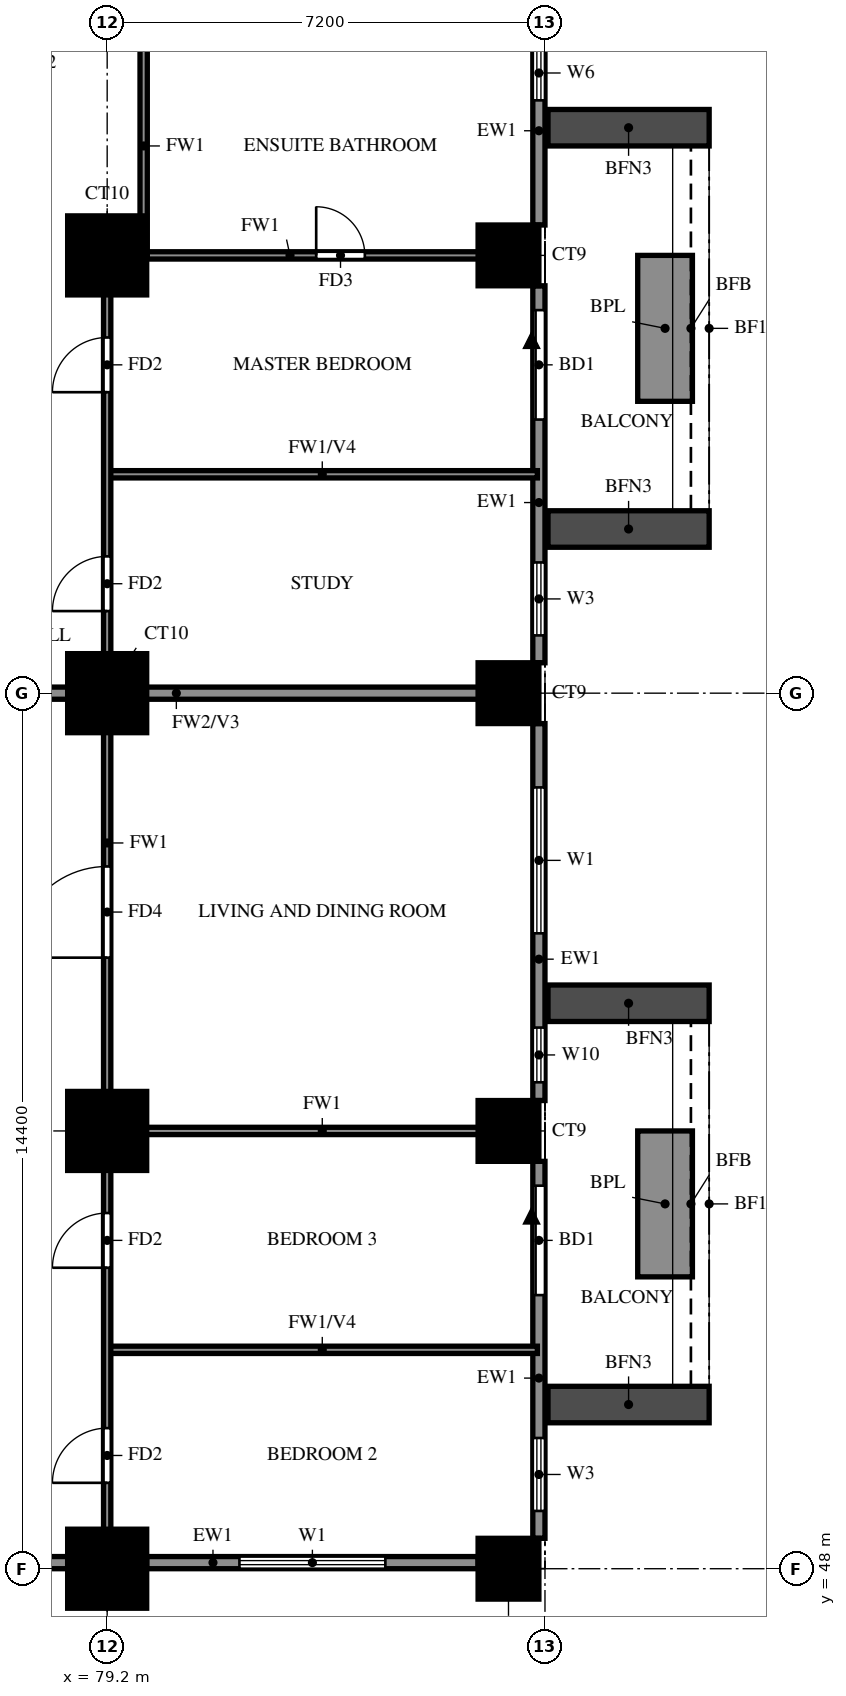
"""IFC4 building model, lengths in metres.
Left out: names, types, materials, properties, quantities, classifications, styles, units other than length and angle.
Written with IfcOpenShell. Run it as: python <this file> out.ifc"""

import sys

from ifc_helpers import new_model, si_unit, direction, frame, frame_2d, origin, origin_2d, place, context, subcontext, project, spatial, rectangle, extrude, source, transform, mapped, element, fill, save


model = new_model("IFC4")
c1 = context("Model", 3, precision=1e-05, world=origin(), true_north=direction((0.0, 1.0)))
c2 = subcontext(c1, "Body", "Model", "MODEL_VIEW")
j1 = project(units=[si_unit("LENGTHUNIT", "METRE"), si_unit("PLANEANGLEUNIT", "RADIAN")], contexts=[c1])
p1 = place(None, origin())
s1 = spatial("IfcSite", under=j1, at=p1, CompositionType="ELEMENT")
p2 = place(p1, origin())
s2 = spatial("IfcBuilding", under=s1, at=p2, CompositionType="ELEMENT")
p3 = place(p2, frame((0.0, 0.0, 65.5)))
s3 = spatial("IfcBuildingStorey", under=s2, at=p3, CompositionType="ELEMENT", Elevation=65.5)
m1 = source(origin(), c2, "Body", "SweptSolid", [
    extrude(rectangle(XDim=1.3, YDim=1.3, at=origin_2d()), origin(), (0.0, 0.0, 1.0), 3.18),
])
p4 = place(p3, frame((79.2, 48.0, 0.0), z_axis=(0.0, 0.0, 1.0), x_axis=(1.0, 0.0, 0.0)))
e1 = element("IfcColumn", 1, at=p4, inside=s3, PredefinedType="COLUMN", context=c2, shape_type="MappedRepresentation", body=[
    mapped(m1, transform((0.0, 0.0, 0.0))),
])
m2 = source(origin(), c2, "Body", "SweptSolid", [
    extrude(rectangle(XDim=1.0, YDim=1.0, at=origin_2d()), origin(), (0.0, 0.0, 1.0), 3.18),
])
p5 = place(p3, frame((85.8, 48.0, 0.0), z_axis=(0.0, 0.0, 1.0), x_axis=(1.0, 0.0, 0.0)))
e2 = element("IfcColumn", 2, at=p5, inside=s3, PredefinedType="COLUMN", context=c2, shape_type="MappedRepresentation", body=[
    mapped(m2, transform((0.0, 0.0, 0.0))),
])
p6 = place(p3, frame((79.2, 55.2, 0.0), z_axis=(0.0, 0.0, 1.0), x_axis=(1.0, 0.0, 0.0)))
e3 = element("IfcColumn", 3, at=p6, inside=s3, PredefinedType="COLUMN", context=c2, shape_type="MappedRepresentation", body=[
    mapped(m1, transform((0.0, 0.0, 0.0))),
])
p7 = place(p3, frame((85.8, 55.2, 0.0), z_axis=(0.0, 0.0, 1.0), x_axis=(1.0, 0.0, 0.0)))
e4 = element("IfcColumn", 4, at=p7, inside=s3, PredefinedType="COLUMN", context=c2, shape_type="MappedRepresentation", body=[
    mapped(m2, transform((0.0, 0.0, 0.0))),
])
p8 = place(p3, frame((79.2, 62.4, 0.0), z_axis=(0.0, 0.0, 1.0), x_axis=(1.0, 0.0, 0.0)))
e5 = element("IfcColumn", 5, at=p8, inside=s3, PredefinedType="COLUMN", context=c2, shape_type="MappedRepresentation", body=[
    mapped(m1, transform((0.0, 0.0, 0.0))),
])
p9 = place(p3, frame((85.8, 62.4, 0.0), z_axis=(0.0, 0.0, 1.0), x_axis=(1.0, 0.0, 0.0)))
e6 = element("IfcColumn", 6, at=p9, inside=s3, PredefinedType="COLUMN", context=c2, shape_type="MappedRepresentation", body=[
    mapped(m2, transform((0.0, 0.0, 0.0))),
])
p10 = place(p3, frame((79.2, 69.6, 0.0), z_axis=(0.0, 0.0, 1.0), x_axis=(1.0, 0.0, 0.0)))
e7 = element("IfcColumn", 7, at=p10, inside=s3, PredefinedType="COLUMN", context=c2, shape_type="MappedRepresentation", body=[
    mapped(m1, transform((0.0, 0.0, 0.0))),
])
p11 = place(p3, frame((85.8, 69.6, 0.0), z_axis=(0.0, 0.0, 1.0), x_axis=(1.0, 0.0, 0.0)))
e8 = element("IfcColumn", 8, at=p11, inside=s3, PredefinedType="COLUMN", context=c2, shape_type="MappedRepresentation", body=[
    mapped(m2, transform((0.0, 0.0, 0.0))),
])
p12 = place(p3, frame((85.996, 33.863, 0.0), z_axis=(0.0, 0.0, 1.0), x_axis=(-0.707100718496, 0.707112843825, 0.0)))
e9 = element("IfcWall", 9, at=p12, inside=s3, PredefinedType="SOLIDWALL", context=c2, shape_type="SweptSolid", body=[
    extrude(rectangle(XDim=20.135, YDim=0.2, at=frame_2d((10.067, 0.0))), origin(), (0.0, 0.0, 1.0), 3.18),
])
p13 = place(p3, frame((71.989, 48.1, 0.0), z_axis=(0.0, 0.0, 1.0), x_axis=(1.0, 0.0, 0.0)))
e10 = element("IfcWall", 10, at=p13, inside=s3, PredefinedType="SOLIDWALL", context=c2, shape_type="SweptSolid", body=[
    extrude(rectangle(XDim=6.562, YDim=0.2, at=frame_2d((3.281, 0.0))), origin(), (0.0, 0.0, 1.0), 3.18),
])
p14 = place(p3, frame((79.85, 48.1, 0.0), z_axis=(0.0, 0.0, 1.0), x_axis=(1.0, 0.0, 0.0)))
e11 = element("IfcWall", 11, at=p14, inside=s3, PredefinedType="SOLIDWALL", context=c2, shape_type="SweptSolid", body=[
    extrude(rectangle(XDim=5.45, YDim=0.2, at=frame_2d((2.725, 0.0))), origin(), (0.0, 0.0, 1.0), 3.18),
])
p15 = place(p14, frame((1.525, 0.0, 0.6)))
e12 = element("IfcOpeningElement", 12, at=p15, cuts=e11, PredefinedType="OPENING", context=c2, shape_type="SweptSolid", body=[
    extrude(rectangle(XDim=2.4, YDim=2.4, at=frame_2d((1.2, 1.2))), frame((0.0, 0.11, 0.0), z_axis=(0.0, -1.0, 0.0), x_axis=(1.0, 0.0, 0.0)), (0.0, 0.0, 1.0), 0.22),
])
p16 = place(p3, frame((86.3, 48.5, 0.0), z_axis=(0.0, 0.0, 1.0), x_axis=(0.0, 1.0, 0.0)))
e13 = element("IfcWall", 13, at=p16, inside=s3, PredefinedType="SOLIDWALL", context=c2, shape_type="SweptSolid", body=[
    extrude(rectangle(XDim=6.2, YDim=0.2, at=frame_2d((3.1, 0.0))), origin(), (0.0, 0.0, 1.0), 3.18),
])
p17 = place(p16, frame((4.0, 0.0, 0.0)))
e14 = element("IfcOpeningElement", 14, at=p17, cuts=e13, PredefinedType="OPENING", context=c2, shape_type="SweptSolid", body=[
    extrude(rectangle(XDim=1.8, YDim=2.4, at=frame_2d((0.9, 1.2))), frame((0.0, 0.11, 0.0), z_axis=(0.0, -1.0, 0.0), x_axis=(1.0, 0.0, 0.0)), (0.0, 0.0, 1.0), 0.22),
])
p18 = place(p16, frame((0.45, 0.0, 0.6)))
e15 = element("IfcOpeningElement", 15, at=p18, cuts=e13, PredefinedType="OPENING", context=c2, shape_type="SweptSolid", body=[
    extrude(rectangle(XDim=1.2, YDim=2.4, at=frame_2d((0.6, 1.2))), frame((0.0, 0.11, 0.0), z_axis=(0.0, -1.0, 0.0), x_axis=(1.0, 0.0, 0.0)), (0.0, 0.0, 1.0), 0.22),
])
p19 = place(p3, frame((86.3, 55.7, 0.0), z_axis=(0.0, 0.0, 1.0), x_axis=(0.0, 1.0, 0.0)))
e16 = element("IfcWall", 16, at=p19, inside=s3, PredefinedType="SOLIDWALL", context=c2, shape_type="SweptSolid", body=[
    extrude(rectangle(XDim=6.2, YDim=0.2, at=frame_2d((3.1, 0.0))), origin(), (0.0, 0.0, 1.0), 3.18),
])
p20 = place(p19, frame((0.3, 0.0, 0.6)))
e17 = element("IfcOpeningElement", 17, at=p20, cuts=e16, PredefinedType="OPENING", context=c2, shape_type="SweptSolid", body=[
    extrude(rectangle(XDim=0.9, YDim=2.4, at=frame_2d((0.45, 1.2))), frame((0.0, 0.11, 0.0), z_axis=(0.0, -1.0, 0.0), x_axis=(1.0, 0.0, 0.0)), (0.0, 0.0, 1.0), 0.22),
])
p21 = place(p19, frame((2.75, 0.0, 0.6)))
e18 = element("IfcOpeningElement", 18, at=p21, cuts=e16, PredefinedType="OPENING", context=c2, shape_type="SweptSolid", body=[
    extrude(rectangle(XDim=2.4, YDim=2.4, at=frame_2d((1.2, 1.2))), frame((0.0, 0.11, 0.0), z_axis=(0.0, -1.0, 0.0), x_axis=(1.0, 0.0, 0.0)), (0.0, 0.0, 1.0), 0.22),
])
p22 = place(p3, frame((86.3, 62.9, 0.0), z_axis=(0.0, 0.0, 1.0), x_axis=(0.0, 1.0, 0.0)))
e19 = element("IfcWall", 19, at=p22, inside=s3, PredefinedType="SOLIDWALL", context=c2, shape_type="SweptSolid", body=[
    extrude(rectangle(XDim=6.2, YDim=0.2, at=frame_2d((3.1, 0.0))), origin(), (0.0, 0.0, 1.0), 3.18),
])
p23 = place(p22, frame((4.0, 0.0, 0.0)))
e20 = element("IfcOpeningElement", 20, at=p23, cuts=e19, PredefinedType="OPENING", context=c2, shape_type="SweptSolid", body=[
    extrude(rectangle(XDim=1.8, YDim=2.4, at=frame_2d((0.9, 1.2))), frame((0.0, 0.11, 0.0), z_axis=(0.0, -1.0, 0.0), x_axis=(1.0, 0.0, 0.0)), (0.0, 0.0, 1.0), 0.22),
])
p24 = place(p22, frame((0.45, 0.0, 0.6)))
e21 = element("IfcOpeningElement", 21, at=p24, cuts=e19, PredefinedType="OPENING", context=c2, shape_type="SweptSolid", body=[
    extrude(rectangle(XDim=1.2, YDim=2.4, at=frame_2d((0.6, 1.2))), frame((0.0, 0.11, 0.0), z_axis=(0.0, -1.0, 0.0), x_axis=(1.0, 0.0, 0.0)), (0.0, 0.0, 1.0), 0.22),
])
p25 = place(p3, frame((86.3, 70.1, 0.0), z_axis=(0.0, 0.0, 1.0), x_axis=(0.0, 1.0, 0.0)))
e22 = element("IfcWall", 22, at=p25, inside=s3, PredefinedType="SOLIDWALL", context=c2, shape_type="SweptSolid", body=[
    extrude(rectangle(XDim=6.2, YDim=0.2, at=frame_2d((3.1, 0.0))), origin(), (0.0, 0.0, 1.0), 3.18),
])
p26 = place(p25, frame((2.05, 0.0, 1.5)))
e23 = element("IfcOpeningElement", 23, at=p26, cuts=e22, PredefinedType="OPENING", context=c2, shape_type="SweptSolid", body=[
    extrude(rectangle(XDim=0.9, YDim=0.9, at=frame_2d((0.45, 0.45))), frame((0.0, 0.11, 0.0), z_axis=(0.0, -1.0, 0.0), x_axis=(1.0, 0.0, 0.0)), (0.0, 0.0, 1.0), 0.22),
])
p27 = place(p25, frame((3.65, 0.0, 0.6)))
e24 = element("IfcOpeningElement", 24, at=p27, cuts=e22, PredefinedType="OPENING", context=c2, shape_type="SweptSolid", body=[
    extrude(rectangle(XDim=1.8, YDim=2.4, at=frame_2d((0.9, 1.2))), frame((0.0, 0.11, 0.0), z_axis=(0.0, -1.0, 0.0), x_axis=(1.0, 0.0, 0.0)), (0.0, 0.0, 1.0), 0.22),
])
for number, where, z_axis, x_axis in (
    (25, (86.45, 50.7, 0.0), (0.0, 0.0, 1.0), (1.0, 0.0, 0.0)),
    (26, (86.45, 57.3, 0.0), (0.0, 0.0, 1.0), (1.0, 0.0, 0.0)),
):
    element("IfcWall", number, at=place(p3, frame(where, z_axis=z_axis, x_axis=x_axis)), inside=s3, PredefinedType="SOLIDWALL", context=c2, shape_type="SweptSolid", body=[
        extrude(rectangle(XDim=2.65, YDim=0.6, at=frame_2d((1.325, 0.0))), origin(), (0.0, 0.0, 1.0), 2.85),
    ])
p28 = place(p3, frame((88.375, 52.8, 0.0), z_axis=(0.0, 0.0, 1.0), x_axis=(0.0, 1.0, 0.0)))
e27 = element("IfcWall", 27, at=p28, inside=s3, PredefinedType="SOLIDWALL", context=c2, shape_type="SweptSolid", body=[
    extrude(rectangle(XDim=2.4, YDim=0.9, at=frame_2d((1.2, 0.0))), origin(), (0.0, 0.0, 1.0), 0.9),
])
for number, where, z_axis, x_axis in (
    (28, (86.45, 65.1, 0.0), (0.0, 0.0, 1.0), (1.0, 0.0, 0.0)),
    (29, (86.45, 71.7, 0.0), (0.0, 0.0, 1.0), (1.0, 0.0, 0.0)),
):
    element("IfcWall", number, at=place(p3, frame(where, z_axis=z_axis, x_axis=x_axis)), inside=s3, PredefinedType="SOLIDWALL", context=c2, shape_type="SweptSolid", body=[
        extrude(rectangle(XDim=2.65, YDim=0.6, at=frame_2d((1.325, 0.0))), origin(), (0.0, 0.0, 1.0), 2.85),
    ])
p29 = place(p3, frame((88.375, 67.2, 0.0), z_axis=(0.0, 0.0, 1.0), x_axis=(0.0, 1.0, 0.0)))
e30 = element("IfcWall", 30, at=p29, inside=s3, PredefinedType="SOLIDWALL", context=c2, shape_type="SweptSolid", body=[
    extrude(rectangle(XDim=2.4, YDim=0.9, at=frame_2d((1.2, 0.0))), origin(), (0.0, 0.0, 1.0), 0.9),
])
p30 = place(p3, frame((74.4, 62.4, 0.0), z_axis=(0.0, 0.0, 1.0), x_axis=(1.0, 0.0, 0.0)))
e31 = element("IfcWall", 31, at=p30, inside=s3, PredefinedType="SOLIDWALL", context=c2, shape_type="SweptSolid", body=[
    extrude(rectangle(XDim=11.875, YDim=0.2, at=frame_2d((5.938, 0.0))), origin(), (0.0, 0.0, 1.0), 3.18),
])
p31 = place(p3, frame((79.2, 51.6, 0.0), z_axis=(0.0, 0.0, 1.0), x_axis=(1.0, 0.0, 0.0)))
e32 = element("IfcWall", 32, at=p31, inside=s3, PredefinedType="PARTITIONING", context=c2, shape_type="SweptSolid", body=[
    extrude(rectangle(XDim=7.075, YDim=0.12, at=frame_2d((3.538, 0.0))), origin(), (0.0, 0.0, 1.0), 2.28),
])
p32 = place(p3, frame((79.2, 55.2, 0.0), z_axis=(0.0, 0.0, 1.0), x_axis=(1.0, 0.0, 0.0)))
e33 = element("IfcWall", 33, at=p32, inside=s3, PredefinedType="PARTITIONING", context=c2, shape_type="SweptSolid", body=[
    extrude(rectangle(XDim=7.075, YDim=0.12, at=frame_2d((3.538, 0.0))), origin(), (0.0, 0.0, 1.0), 3.18),
])
p33 = place(p3, frame((79.2, 66.0, 0.0), z_axis=(0.0, 0.0, 1.0), x_axis=(1.0, 0.0, 0.0)))
e34 = element("IfcWall", 34, at=p33, inside=s3, PredefinedType="PARTITIONING", context=c2, shape_type="SweptSolid", body=[
    extrude(rectangle(XDim=7.075, YDim=0.12, at=frame_2d((3.538, 0.0))), origin(), (0.0, 0.0, 1.0), 2.28),
])
p34 = place(p3, frame((79.2, 69.6, 0.0), z_axis=(0.0, 0.0, 1.0), x_axis=(1.0, 0.0, 0.0)))
e35 = element("IfcWall", 35, at=p34, inside=s3, PredefinedType="PARTITIONING", context=c2, shape_type="SweptSolid", body=[
    extrude(rectangle(XDim=7.075, YDim=0.12, at=frame_2d((3.538, 0.0))), origin(), (0.0, 0.0, 1.0), 3.18),
])
p35 = place(p34, frame((3.438, 0.0, 0.0)))
e36 = element("IfcOpeningElement", 36, at=p35, cuts=e35, PredefinedType="OPENING", context=c2, shape_type="SweptSolid", body=[
    extrude(rectangle(XDim=0.8, YDim=2.1, at=frame_2d((0.4, 1.05))), frame((0.0, 0.07, 0.0), z_axis=(0.0, -1.0, 0.0), x_axis=(1.0, 0.0, 0.0)), (0.0, 0.0, 1.0), 0.14),
])
p36 = place(p3, frame((79.2, 48.125, 0.0), z_axis=(0.0, 0.0, 1.0), x_axis=(0.0, 1.0, 0.0)))
e37 = element("IfcWall", 37, at=p36, inside=s3, PredefinedType="PARTITIONING", context=c2, shape_type="SweptSolid", body=[
    extrude(rectangle(XDim=21.475, YDim=0.12, at=frame_2d((10.738, 0.0))), origin(), (0.0, 0.0, 1.0), 3.18),
])
p37 = place(p36, frame((1.288, 0.0, 0.0)))
e38 = element("IfcOpeningElement", 38, at=p37, cuts=e37, PredefinedType="OPENING", context=c2, shape_type="SweptSolid", body=[
    extrude(rectangle(XDim=0.9, YDim=2.1, at=frame_2d((0.45, 1.05))), frame((0.0, 0.07, 0.0), z_axis=(0.0, -1.0, 0.0), x_axis=(1.0, 0.0, 0.0)), (0.0, 0.0, 1.0), 0.14),
])
p38 = place(p36, frame((4.825, 0.0, 0.0)))
e39 = element("IfcOpeningElement", 39, at=p38, cuts=e37, PredefinedType="OPENING", context=c2, shape_type="SweptSolid", body=[
    extrude(rectangle(XDim=0.9, YDim=2.1, at=frame_2d((0.45, 1.05))), frame((0.0, 0.07, 0.0), z_axis=(0.0, -1.0, 0.0), x_axis=(1.0, 0.0, 0.0)), (0.0, 0.0, 1.0), 0.14),
])
p39 = place(p36, frame((9.925, 0.0, 0.0)))
e40 = element("IfcOpeningElement", 40, at=p39, cuts=e37, PredefinedType="OPENING", context=c2, shape_type="SweptSolid", body=[
    extrude(rectangle(XDim=1.5, YDim=2.1, at=frame_2d((0.75, 1.05))), frame((0.0, 0.07, 0.0), z_axis=(0.0, -1.0, 0.0), x_axis=(1.0, 0.0, 0.0)), (0.0, 0.0, 1.0), 0.14),
])
p40 = place(p36, frame((15.625, 0.0, 0.0)))
e41 = element("IfcOpeningElement", 41, at=p40, cuts=e37, PredefinedType="OPENING", context=c2, shape_type="SweptSolid", body=[
    extrude(rectangle(XDim=0.9, YDim=2.1, at=frame_2d((0.45, 1.05))), frame((0.0, 0.07, 0.0), z_axis=(0.0, -1.0, 0.0), x_axis=(1.0, 0.0, 0.0)), (0.0, 0.0, 1.0), 0.14),
])
p41 = place(p36, frame((19.225, 0.0, 0.0)))
e42 = element("IfcOpeningElement", 42, at=p41, cuts=e37, PredefinedType="OPENING", context=c2, shape_type="SweptSolid", body=[
    extrude(rectangle(XDim=0.9, YDim=2.1, at=frame_2d((0.45, 1.05))), frame((0.0, 0.07, 0.0), z_axis=(0.0, -1.0, 0.0), x_axis=(1.0, 0.0, 0.0)), (0.0, 0.0, 1.0), 0.14),
])
p42 = place(p3, frame((79.8, 69.6, 0.0), z_axis=(0.0, 0.0, 1.0), x_axis=(0.0, 1.0, 0.0)))
e43 = element("IfcWall", 43, at=p42, inside=s3, PredefinedType="PARTITIONING", context=c2, shape_type="SweptSolid", body=[
    extrude(rectangle(XDim=3.6, YDim=0.12, at=frame_2d((1.8, 0.0))), origin(), (0.0, 0.0, 1.0), 3.18),
])
p43 = place(p15, origin())
e44 = element("IfcWindow", 44, at=p43, inside=s3, PartitioningType="DOUBLE_PANEL_VERTICAL", PredefinedType="WINDOW", context=c2, shape_type="SweptSolid", body=[
    extrude(rectangle(XDim=2.4, YDim=2.4, at=frame_2d((1.2, 1.2))), frame((0.0, 0.03, 0.0), z_axis=(0.0, -1.0, 0.0), x_axis=(1.0, 0.0, 0.0)), (0.0, 0.0, 1.0), 0.06),
])
fill(e12, e44)
p44 = place(p17, origin())
e45 = element("IfcDoor", 45, at=p44, inside=s3, OperationType="DOUBLE_DOOR_SLIDING", PredefinedType="DOOR", context=c2, shape_type="SweptSolid", body=[
    extrude(rectangle(XDim=1.8, YDim=2.4, at=frame_2d((0.9, 1.2))), frame((0.0, 0.025, 0.0), z_axis=(0.0, -1.0, 0.0), x_axis=(1.0, 0.0, 0.0)), (0.0, 0.0, 1.0), 0.05),
])
fill(e14, e45)
p45 = place(p18, origin())
e46 = element("IfcWindow", 46, at=p45, inside=s3, PartitioningType="SINGLE_PANEL", PredefinedType="WINDOW", context=c2, shape_type="SweptSolid", body=[
    extrude(rectangle(XDim=1.2, YDim=2.4, at=frame_2d((0.6, 1.2))), frame((0.0, 0.03, 0.0), z_axis=(0.0, -1.0, 0.0), x_axis=(1.0, 0.0, 0.0)), (0.0, 0.0, 1.0), 0.06),
])
fill(e15, e46)
p46 = place(p20, origin())
e47 = element("IfcWindow", 47, at=p46, inside=s3, PartitioningType="SINGLE_PANEL", PredefinedType="WINDOW", context=c2, shape_type="SweptSolid", body=[
    extrude(rectangle(XDim=0.9, YDim=2.4, at=frame_2d((0.45, 1.2))), frame((0.0, 0.03, 0.0), z_axis=(0.0, -1.0, 0.0), x_axis=(1.0, 0.0, 0.0)), (0.0, 0.0, 1.0), 0.06),
])
fill(e17, e47)
p47 = place(p21, origin())
e48 = element("IfcWindow", 48, at=p47, inside=s3, PartitioningType="DOUBLE_PANEL_VERTICAL", PredefinedType="WINDOW", context=c2, shape_type="SweptSolid", body=[
    extrude(rectangle(XDim=2.4, YDim=2.4, at=frame_2d((1.2, 1.2))), frame((0.0, 0.03, 0.0), z_axis=(0.0, -1.0, 0.0), x_axis=(1.0, 0.0, 0.0)), (0.0, 0.0, 1.0), 0.06),
])
fill(e18, e48)
p48 = place(p23, origin())
e49 = element("IfcDoor", 49, at=p48, inside=s3, OperationType="DOUBLE_DOOR_SLIDING", PredefinedType="DOOR", context=c2, shape_type="SweptSolid", body=[
    extrude(rectangle(XDim=1.8, YDim=2.4, at=frame_2d((0.9, 1.2))), frame((0.0, 0.025, 0.0), z_axis=(0.0, -1.0, 0.0), x_axis=(1.0, 0.0, 0.0)), (0.0, 0.0, 1.0), 0.05),
])
fill(e20, e49)
p49 = place(p24, origin())
e50 = element("IfcWindow", 50, at=p49, inside=s3, PartitioningType="SINGLE_PANEL", PredefinedType="WINDOW", context=c2, shape_type="SweptSolid", body=[
    extrude(rectangle(XDim=1.2, YDim=2.4, at=frame_2d((0.6, 1.2))), frame((0.0, 0.03, 0.0), z_axis=(0.0, -1.0, 0.0), x_axis=(1.0, 0.0, 0.0)), (0.0, 0.0, 1.0), 0.06),
])
fill(e21, e50)
p50 = place(p26, origin())
e51 = element("IfcWindow", 51, at=p50, inside=s3, PartitioningType="SINGLE_PANEL", PredefinedType="WINDOW", context=c2, shape_type="SweptSolid", body=[
    extrude(rectangle(XDim=0.9, YDim=0.9, at=frame_2d((0.45, 0.45))), frame((0.0, 0.03, 0.0), z_axis=(0.0, -1.0, 0.0), x_axis=(1.0, 0.0, 0.0)), (0.0, 0.0, 1.0), 0.06),
])
fill(e23, e51)
p51 = place(p37, origin())
e52 = element("IfcDoor", 52, at=p51, inside=s3, OperationType="SINGLE_SWING_RIGHT", PredefinedType="DOOR", context=c2, shape_type="SweptSolid", body=[
    extrude(rectangle(XDim=0.9, YDim=2.1, at=frame_2d((0.45, 1.05))), frame((0.0, 0.025, 0.0), z_axis=(0.0, -1.0, 0.0), x_axis=(1.0, 0.0, 0.0)), (0.0, 0.0, 1.0), 0.05),
])
fill(e38, e52)
p52 = place(p38, origin())
e53 = element("IfcDoor", 53, at=p52, inside=s3, OperationType="SINGLE_SWING_LEFT", PredefinedType="DOOR", context=c2, shape_type="SweptSolid", body=[
    extrude(rectangle(XDim=0.9, YDim=2.1, at=frame_2d((0.45, 1.05))), frame((0.0, 0.025, 0.0), z_axis=(0.0, -1.0, 0.0), x_axis=(1.0, 0.0, 0.0)), (0.0, 0.0, 1.0), 0.05),
])
fill(e39, e53)
p53 = place(p39, origin())
e54 = element("IfcDoor", 54, at=p53, inside=s3, OperationType="SINGLE_SWING_LEFT", PredefinedType="DOOR", context=c2, shape_type="SweptSolid", body=[
    extrude(rectangle(XDim=1.5, YDim=2.1, at=frame_2d((0.75, 1.05))), frame((0.0, 0.025, 0.0), z_axis=(0.0, -1.0, 0.0), x_axis=(1.0, 0.0, 0.0)), (0.0, 0.0, 1.0), 0.05),
])
fill(e40, e54)
p54 = place(p40, origin())
e55 = element("IfcDoor", 55, at=p54, inside=s3, OperationType="SINGLE_SWING_LEFT", PredefinedType="DOOR", context=c2, shape_type="SweptSolid", body=[
    extrude(rectangle(XDim=0.9, YDim=2.1, at=frame_2d((0.45, 1.05))), frame((0.0, 0.025, 0.0), z_axis=(0.0, -1.0, 0.0), x_axis=(1.0, 0.0, 0.0)), (0.0, 0.0, 1.0), 0.05),
])
fill(e41, e55)
p55 = place(p41, origin())
e56 = element("IfcDoor", 56, at=p55, inside=s3, OperationType="SINGLE_SWING_RIGHT", PredefinedType="DOOR", context=c2, shape_type="SweptSolid", body=[
    extrude(rectangle(XDim=0.9, YDim=2.1, at=frame_2d((0.45, 1.05))), frame((0.0, 0.025, 0.0), z_axis=(0.0, -1.0, 0.0), x_axis=(1.0, 0.0, 0.0)), (0.0, 0.0, 1.0), 0.05),
])
fill(e42, e56)
p56 = place(p35, origin())
e57 = element("IfcDoor", 57, at=p56, inside=s3, OperationType="SINGLE_SWING_LEFT", PredefinedType="DOOR", context=c2, shape_type="SweptSolid", body=[
    extrude(rectangle(XDim=0.8, YDim=2.1, at=frame_2d((0.4, 1.05))), frame((0.0, 0.025, 0.0), z_axis=(0.0, -1.0, 0.0), x_axis=(1.0, 0.0, 0.0)), (0.0, 0.0, 1.0), 0.05),
])
fill(e36, e57)
save(model, sys.argv[1])
